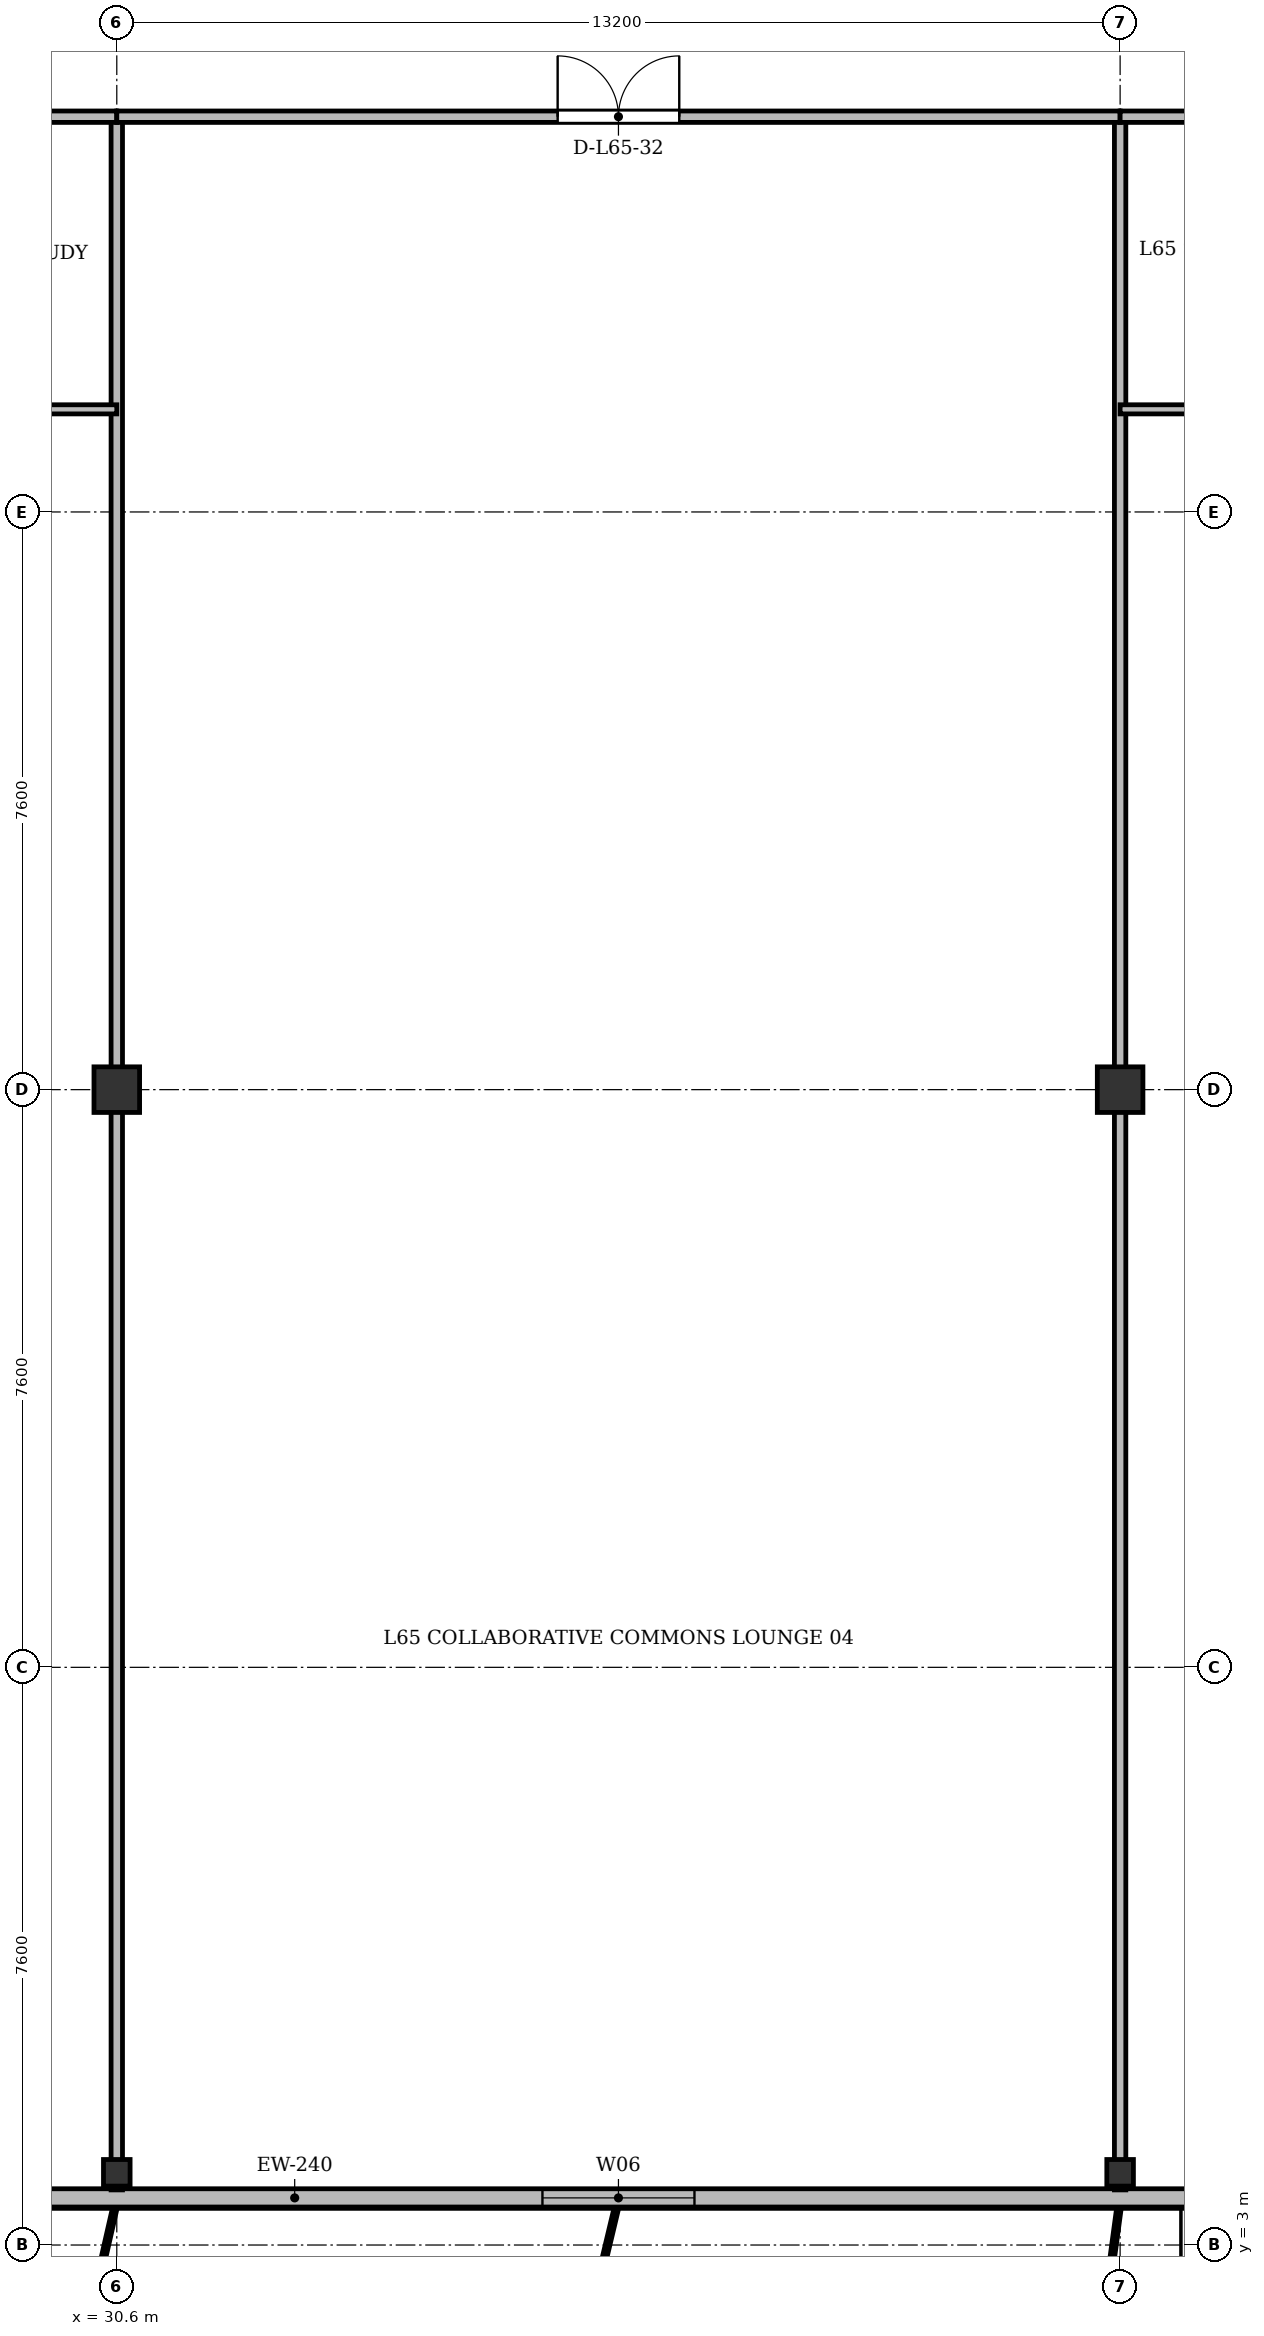
"""IFC4 building model, lengths in metres.
Left out: names, types, materials, properties, quantities, classifications, styles, units other than length and angle.
Written with IfcOpenShell. Run it as: python <this file> out.ifc"""

import sys

from ifc_helpers import new_model, si_unit, direction, frame, frame_2d, origin, origin_2d, place, context, subcontext, project, spatial, rectangle, i_section, extrude, source, transform, mapped, element, fill, save


model = new_model("IFC4")
c1 = context("Model", 3, precision=1e-05, world=origin(), true_north=direction((0.0, 1.0)))
c2 = subcontext(c1, "Body", "Model", "MODEL_VIEW")
j1 = project(units=[si_unit("LENGTHUNIT", "METRE"), si_unit("PLANEANGLEUNIT", "RADIAN")], contexts=[c1])
p1 = place(None, origin())
s1 = spatial("IfcSite", under=j1, at=p1, CompositionType="ELEMENT")
p2 = place(p1, origin())
s2 = spatial("IfcBuilding", under=s1, at=p2, CompositionType="ELEMENT")
p3 = place(p2, frame((0.0, 0.0, 252.3)))
s3 = spatial("IfcBuildingStorey", under=s2, at=p3, CompositionType="ELEMENT", Elevation=252.3)
m1 = source(origin(), c2, "Body", "SweptSolid", [
    extrude(i_section(OverallWidth=0.35, OverallDepth=0.35, WebThickness=0.018, FlangeThickness=0.028, at=origin_2d()), origin(), (0.0, 0.0, 1.0), 3.6),
])
p4 = place(p3, frame((30.6, 3.95, 0.0), z_axis=(0.0, 0.0, 1.0), x_axis=(1.0, 0.0, 0.0)))
e1 = element("IfcColumn", 1, at=p4, inside=s3, PredefinedType="COLUMN", context=c2, shape_type="MappedRepresentation", body=[
    mapped(m1, transform((0.0, 0.0, 0.0), x_axis=(1.0, 0.0, 0.0), y_axis=(0.0, 1.0, 0.0), z_axis=(0.0, 0.0, 1.0), scale=1.0)),
])
m2 = source(origin(), c2, "Body", "SweptSolid", [
    extrude(rectangle(XDim=0.6, YDim=0.6, at=origin_2d()), origin(), (0.0, 0.0, 1.0), 3.6),
])
p5 = place(p3, frame((30.6, 18.2, 0.0), z_axis=(0.0, 0.0, 1.0), x_axis=(1.0, 0.0, 0.0)))
e2 = element("IfcColumn", 2, at=p5, inside=s3, PredefinedType="COLUMN", context=c2, shape_type="MappedRepresentation", body=[
    mapped(m2, transform((0.0, 0.0, 0.0), x_axis=(1.0, 0.0, 0.0), y_axis=(0.0, 1.0, 0.0), z_axis=(0.0, 0.0, 1.0), scale=1.0)),
])
p6 = place(p3, frame((43.8, 3.95, 0.0), z_axis=(0.0, 0.0, 1.0), x_axis=(1.0, 0.0, 0.0)))
e3 = element("IfcColumn", 3, at=p6, inside=s3, PredefinedType="COLUMN", context=c2, shape_type="MappedRepresentation", body=[
    mapped(m1, transform((0.0, 0.0, 0.0), x_axis=(1.0, 0.0, 0.0), y_axis=(0.0, 1.0, 0.0), z_axis=(0.0, 0.0, 1.0), scale=1.0)),
])
p7 = place(p3, frame((43.8, 18.2, 0.0), z_axis=(0.0, 0.0, 1.0), x_axis=(1.0, 0.0, 0.0)))
e4 = element("IfcColumn", 4, at=p7, inside=s3, PredefinedType="COLUMN", context=c2, shape_type="MappedRepresentation", body=[
    mapped(m2, transform((0.0, 0.0, 0.0), x_axis=(1.0, 0.0, 0.0), y_axis=(0.0, 1.0, 0.0), z_axis=(0.0, 0.0, 1.0), scale=1.0)),
])
p8 = place(p3, frame((63.2, 3.62, 0.0), z_axis=(0.0, 0.0, 1.0), x_axis=(-1.0, 0.0, 0.0)))
e5 = element("IfcWall", 5, at=p8, inside=s3, PredefinedType="SOLIDWALL", context=c2, shape_type="SweptSolid", body=[
    extrude(rectangle(XDim=52.0, YDim=0.24, at=frame_2d((26.0, 0.0))), origin(), (0.0, 0.0, 1.0), 3.37),
])
p9 = place(p8, frame((1.345, 0.0, 0.9)))
e6 = element("IfcOpeningElement", 6, at=p9, cuts=e5, PredefinedType="OPENING", context=c2, shape_type="SweptSolid", body=[
    extrude(rectangle(XDim=1.8, YDim=1.8, at=frame_2d((0.9, 0.9))), frame((0.0, 0.13, 0.0), z_axis=(0.0, -1.0, 0.0), x_axis=(1.0, 0.0, 0.0)), (0.0, 0.0, 1.0), 0.26),
])
p10 = place(p8, frame((7.2, 0.0, 0.9)))
e7 = element("IfcOpeningElement", 7, at=p10, cuts=e5, PredefinedType="OPENING", context=c2, shape_type="SweptSolid", body=[
    extrude(rectangle(XDim=2.2, YDim=1.8, at=frame_2d((1.1, 0.9))), frame((0.0, 0.13, 0.0), z_axis=(0.0, -1.0, 0.0), x_axis=(1.0, 0.0, 0.0)), (0.0, 0.0, 1.0), 0.26),
])
p11 = place(p8, frame((14.017, 0.0, 0.0)))
e8 = element("IfcOpeningElement", 8, at=p11, cuts=e5, PredefinedType="OPENING", context=c2, shape_type="SweptSolid", body=[
    extrude(rectangle(XDim=1.2, YDim=2.2, at=frame_2d((0.6, 1.1))), frame((0.0, 0.13, 0.0), z_axis=(0.0, -1.0, 0.0), x_axis=(1.0, 0.0, 0.0)), (0.0, 0.0, 1.0), 0.26),
])
p12 = place(p8, frame((25.0, 0.0, 0.9)))
e9 = element("IfcOpeningElement", 9, at=p12, cuts=e5, PredefinedType="OPENING", context=c2, shape_type="SweptSolid", body=[
    extrude(rectangle(XDim=2.0, YDim=1.95, at=frame_2d((1.0, 0.975))), frame((0.0, 0.13, 0.0), z_axis=(0.0, -1.0, 0.0), x_axis=(1.0, 0.0, 0.0)), (0.0, 0.0, 1.0), 0.26),
])
p13 = place(p8, frame((35.375, 0.0, 0.9)))
e10 = element("IfcOpeningElement", 10, at=p13, cuts=e5, PredefinedType="OPENING", context=c2, shape_type="SweptSolid", body=[
    extrude(rectangle(XDim=1.65, YDim=1.85, at=frame_2d((0.825, 0.925))), frame((0.0, 0.13, 0.0), z_axis=(0.0, -1.0, 0.0), x_axis=(1.0, 0.0, 0.0)), (0.0, 0.0, 1.0), 0.26),
])
p14 = place(p8, frame((45.302, 0.0, 0.0)))
e11 = element("IfcOpeningElement", 11, at=p14, cuts=e5, PredefinedType="OPENING", context=c2, shape_type="SweptSolid", body=[
    extrude(rectangle(XDim=1.2, YDim=2.2, at=frame_2d((0.6, 1.1))), frame((0.0, 0.13, 0.0), z_axis=(0.0, -1.0, 0.0), x_axis=(1.0, 0.0, 0.0)), (0.0, 0.0, 1.0), 0.26),
])
p15 = place(p8, frame((48.655, 0.0, 0.9)))
e12 = element("IfcOpeningElement", 12, at=p15, cuts=e5, PredefinedType="OPENING", context=c2, shape_type="SweptSolid", body=[
    extrude(rectangle(XDim=2.2, YDim=1.8, at=frame_2d((1.1, 0.9))), frame((0.0, 0.13, 0.0), z_axis=(0.0, -1.0, 0.0), x_axis=(1.0, 0.0, 0.0)), (0.0, 0.0, 1.0), 0.26),
])
for number, where, z_axis, x_axis in (
    (13, (30.6, 3.725, 0.0), (0.0, 0.0, 1.0), (0.0, 1.0, 0.0)),
    (14, (43.8, 3.725, 0.0), (0.0, 0.0, 1.0), (0.0, 1.0, 0.0)),
):
    element("IfcWall", number, at=place(p3, frame(where, z_axis=z_axis, x_axis=x_axis)), inside=s3, PredefinedType="PARTITIONING", context=c2, shape_type="SweptSolid", body=[
        extrude(rectangle(XDim=27.275, YDim=0.15, at=frame_2d((13.637, 0.0))), origin(), (0.0, 0.0, 1.0), 2.87),
    ])
p16 = place(p3, frame((23.4, 31.0, 0.0), z_axis=(0.0, 0.0, 1.0), x_axis=(1.0, 0.0, 0.0)))
e15 = element("IfcWall", 15, at=p16, inside=s3, PredefinedType="PARTITIONING", context=c2, shape_type="SweptSolid", body=[
    extrude(rectangle(XDim=7.2, YDim=0.15, at=frame_2d((3.6, 0.0))), origin(), (0.0, 0.0, 1.0), 2.87),
])
p17 = place(p16, frame((3.125, 0.0, 0.0)))
e16 = element("IfcOpeningElement", 16, at=p17, cuts=e15, PredefinedType="OPENING", context=c2, shape_type="SweptSolid", body=[
    extrude(rectangle(XDim=0.95, YDim=2.15, at=frame_2d((0.475, 1.075))), frame((0.0, 0.085, 0.0), z_axis=(0.0, -1.0, 0.0), x_axis=(1.0, 0.0, 0.0)), (0.0, 0.0, 1.0), 0.17),
])
p18 = place(p3, frame((23.4, 27.15, 0.0), z_axis=(0.0, 0.0, 1.0), x_axis=(1.0, 0.0, 0.0)))
e17 = element("IfcWall", 17, at=p18, inside=s3, PredefinedType="PARTITIONING", context=c2, shape_type="SweptSolid", body=[
    extrude(rectangle(XDim=7.2, YDim=0.12, at=frame_2d((3.6, 0.0))), origin(), (0.0, 0.0, 1.0), 2.87),
])
p19 = place(p18, frame((3.125, 0.0, 0.0)))
e18 = element("IfcOpeningElement", 18, at=p19, cuts=e17, PredefinedType="OPENING", context=c2, shape_type="SweptSolid", body=[
    extrude(rectangle(XDim=0.95, YDim=2.15, at=frame_2d((0.475, 1.075))), frame((0.0, 0.07, 0.0), z_axis=(0.0, -1.0, 0.0), x_axis=(1.0, 0.0, 0.0)), (0.0, 0.0, 1.0), 0.14),
])
p20 = place(p3, frame((30.6, 31.0, 0.0), z_axis=(0.0, 0.0, 1.0), x_axis=(1.0, 0.0, 0.0)))
e19 = element("IfcWall", 19, at=p20, inside=s3, PredefinedType="PARTITIONING", context=c2, shape_type="SweptSolid", body=[
    extrude(rectangle(XDim=13.2, YDim=0.15, at=frame_2d((6.6, 0.0))), origin(), (0.0, 0.0, 1.0), 2.87),
])
p21 = place(p20, frame((5.8, 0.0, 0.0)))
e20 = element("IfcOpeningElement", 20, at=p21, cuts=e19, PredefinedType="OPENING", context=c2, shape_type="SweptSolid", body=[
    extrude(rectangle(XDim=1.6, YDim=2.2, at=frame_2d((0.8, 1.1))), frame((0.0, 0.085, 0.0), z_axis=(0.0, -1.0, 0.0), x_axis=(1.0, 0.0, 0.0)), (0.0, 0.0, 1.0), 0.17),
])
p22 = place(p3, frame((43.8, 31.0, 0.0), z_axis=(0.0, 0.0, 1.0), x_axis=(1.0, 0.0, 0.0)))
e21 = element("IfcWall", 21, at=p22, inside=s3, PredefinedType="PARTITIONING", context=c2, shape_type="SweptSolid", body=[
    extrude(rectangle(XDim=7.2, YDim=0.15, at=frame_2d((3.6, 0.0))), origin(), (0.0, 0.0, 1.0), 2.87),
])
p23 = place(p22, frame((3.125, 0.0, 0.0)))
e22 = element("IfcOpeningElement", 22, at=p23, cuts=e21, PredefinedType="OPENING", context=c2, shape_type="SweptSolid", body=[
    extrude(rectangle(XDim=0.95, YDim=2.15, at=frame_2d((0.475, 1.075))), frame((0.0, 0.085, 0.0), z_axis=(0.0, -1.0, 0.0), x_axis=(1.0, 0.0, 0.0)), (0.0, 0.0, 1.0), 0.17),
])
p24 = place(p3, frame((43.8, 27.15, 0.0), z_axis=(0.0, 0.0, 1.0), x_axis=(1.0, 0.0, 0.0)))
e23 = element("IfcWall", 23, at=p24, inside=s3, PredefinedType="PARTITIONING", context=c2, shape_type="SweptSolid", body=[
    extrude(rectangle(XDim=7.2, YDim=0.12, at=frame_2d((3.6, 0.0))), origin(), (0.0, 0.0, 1.0), 2.87),
])
p25 = place(p24, frame((3.125, 0.0, 0.0)))
e24 = element("IfcOpeningElement", 24, at=p25, cuts=e23, PredefinedType="OPENING", context=c2, shape_type="SweptSolid", body=[
    extrude(rectangle(XDim=0.95, YDim=2.15, at=frame_2d((0.475, 1.075))), frame((0.0, 0.07, 0.0), z_axis=(0.0, -1.0, 0.0), x_axis=(1.0, 0.0, 0.0)), (0.0, 0.0, 1.0), 0.14),
])
m3 = source(origin(), c2, "Body", "SweptSolid", [
    extrude(rectangle(XDim=2.0, YDim=1.95, at=frame_2d((1.0, 0.975))), frame((0.0, 0.03, 0.0), z_axis=(0.0, -1.0, 0.0), x_axis=(1.0, 0.0, 0.0)), (0.0, 0.0, 1.0), 0.06),
])
p26 = place(p12, origin())
e25 = element("IfcWindow", 25, at=p26, inside=s3, PartitioningType="SINGLE_PANEL", PredefinedType="WINDOW", context=c2, shape_type="MappedRepresentation", body=[
    mapped(m3, transform((0.0, 0.0, 0.0), x_axis=(1.0, 0.0, 0.0), y_axis=(0.0, 1.0, 0.0), z_axis=(0.0, 0.0, 1.0), scale=1.0)),
])
fill(e9, e25)
m4 = source(origin(), c2, "Body", "SweptSolid", [
    extrude(rectangle(XDim=1.6, YDim=2.2, at=frame_2d((0.8, 1.1))), frame((0.0, 0.025, 0.0), z_axis=(0.0, -1.0, 0.0), x_axis=(1.0, 0.0, 0.0)), (0.0, 0.0, 1.0), 0.05),
])
p27 = place(p21, origin())
e26 = element("IfcDoor", 26, at=p27, inside=s3, OperationType="DOUBLE_DOOR_SINGLE_SWING", PredefinedType="DOOR", context=c2, shape_type="MappedRepresentation", body=[
    mapped(m4, transform((0.0, 0.0, 0.0), x_axis=(1.0, 0.0, 0.0), y_axis=(0.0, 1.0, 0.0), z_axis=(0.0, 0.0, 1.0), scale=1.0)),
])
fill(e20, e26)
save(model, sys.argv[1])
